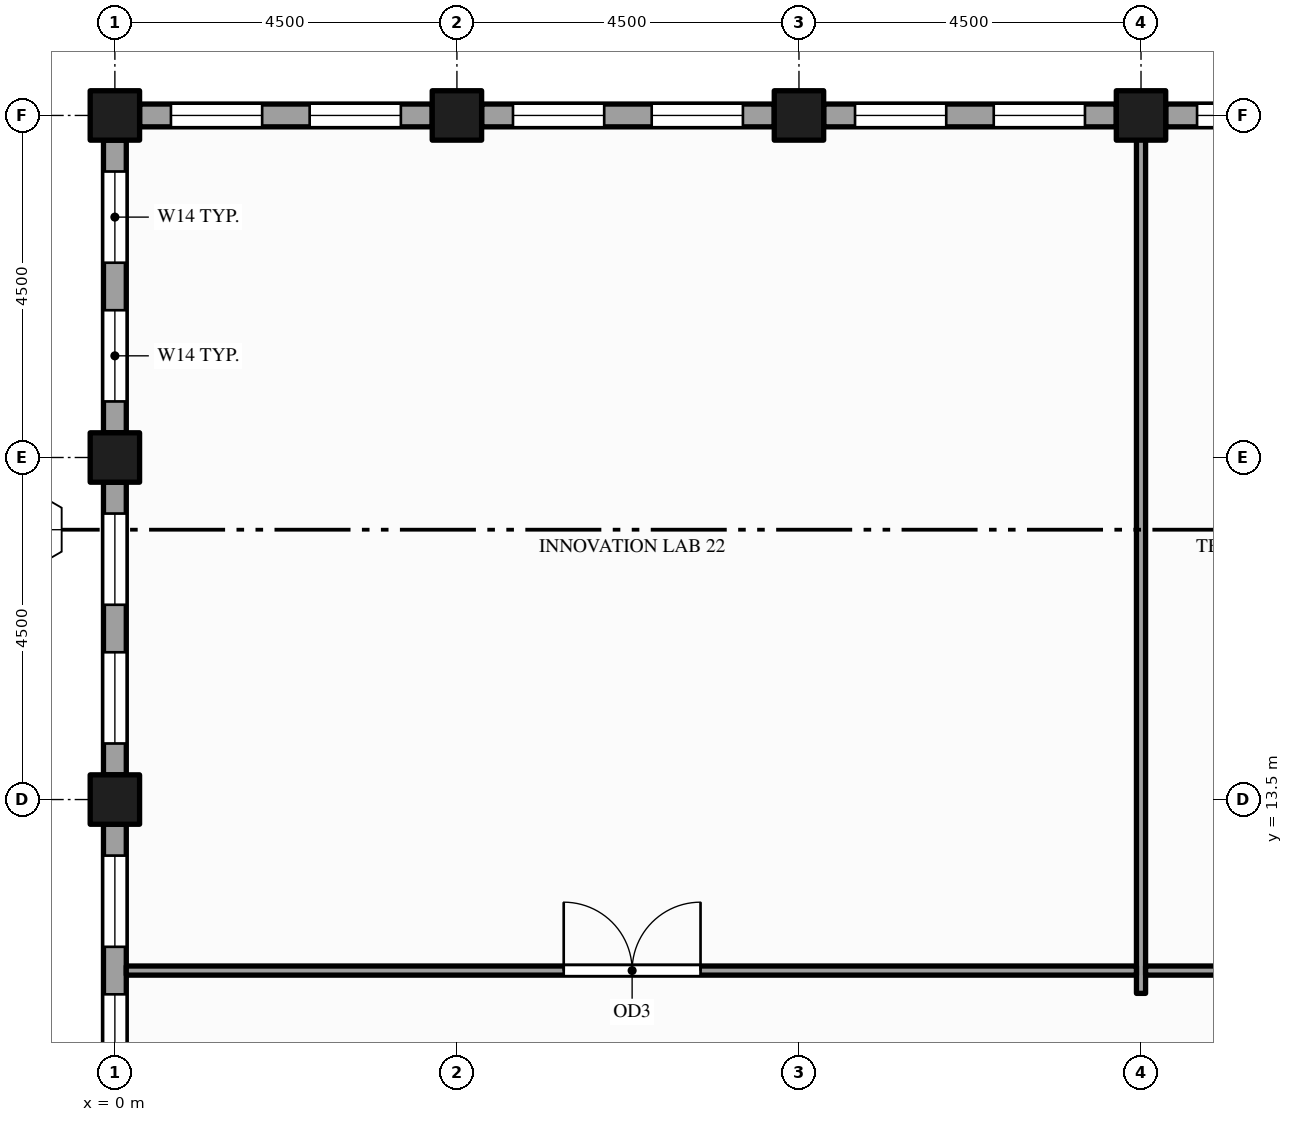
"""IFC4 building model, lengths in metres.
Left out: names, types, materials, properties, quantities, classifications, styles, units other than length and angle.
Written with IfcOpenShell. Run it as: python <this file> out.ifc"""

import sys

from ifc_helpers import new_model, si_unit, direction, frame, frame_2d, origin, origin_2d, place, context, subcontext, project, spatial, rectangle, hollow_rectangle, extrude, element, fill, save


model = new_model("IFC4")
c1 = context("Model", 3, precision=1e-05, world=origin(), true_north=direction((0.0, 1.0)))
c2 = subcontext(c1, "Body", "Model", "MODEL_VIEW")
j1 = project(units=[si_unit("LENGTHUNIT", "METRE"), si_unit("PLANEANGLEUNIT", "RADIAN")], contexts=[c1])
p1 = place(None, origin())
s1 = spatial("IfcSite", under=j1, at=p1, CompositionType="ELEMENT")
p2 = place(p1, origin())
s2 = spatial("IfcBuilding", under=s1, at=p2, CompositionType="ELEMENT")
p3 = place(p2, frame((0.0, 0.0, 289.0)))
s3 = spatial("IfcBuildingStorey", under=s2, at=p3, CompositionType="ELEMENT", Elevation=289.0)
for number, where, z_axis, x_axis in (
    (1, (0.0, 13.5, -0.15), (0.0, 0.0, 1.0), (1.0, 0.0, 0.0)),
    (2, (0.0, 18.0, -0.15), (0.0, 0.0, 1.0), (1.0, 0.0, 0.0)),
    (3, (0.0, 22.5, -0.15), (0.0, 0.0, 1.0), (1.0, 0.0, 0.0)),
    (4, (4.5, 22.5, -0.15), (0.0, 0.0, 1.0), (1.0, 0.0, 0.0)),
    (5, (9.0, 22.5, -0.15), (0.0, 0.0, 1.0), (1.0, 0.0, 0.0)),
    (6, (13.5, 22.5, -0.15), (0.0, 0.0, 1.0), (1.0, 0.0, 0.0)),
):
    element("IfcColumn", number, at=place(p3, frame(where, z_axis=z_axis, x_axis=x_axis)), inside=s3, PredefinedType="COLUMN", context=c2, shape_type="SweptSolid", body=[
        extrude(hollow_rectangle(XDim=0.65, YDim=0.65, WallThickness=0.032, at=origin_2d()), origin(), (0.0, 0.0, 1.0), 4.0),
    ])
p4 = place(p3, frame((17.675, 22.5, 0.0), z_axis=(0.0, 0.0, 1.0), x_axis=(-1.0, 0.0, 0.0)))
e7 = element("IfcWall", 7, at=p4, inside=s3, PredefinedType="STANDARD", context=c2, shape_type="SweptSolid", body=[
    extrude(rectangle(XDim=3.85, YDim=0.3, at=frame_2d((1.925, 0.0))), origin(), (0.0, 0.0, 1.0), 2.87),
])
p5 = place(p4, frame((0.413, 0.0, 0.9)))
e8 = element("IfcOpeningElement", 8, at=p5, cuts=e7, PredefinedType="OPENING", context=c2, shape_type="SweptSolid", body=[
    extrude(rectangle(XDim=1.2, YDim=1.75, at=frame_2d((0.6, 0.875))), frame((0.0, 0.16, 0.0), z_axis=(0.0, -1.0, 0.0), x_axis=(1.0, 0.0, 0.0)), (0.0, 0.0, 1.0), 0.32),
])
p6 = place(p4, frame((2.238, 0.0, 0.9)))
e9 = element("IfcOpeningElement", 9, at=p6, cuts=e7, PredefinedType="OPENING", context=c2, shape_type="SweptSolid", body=[
    extrude(rectangle(XDim=1.2, YDim=1.75, at=frame_2d((0.6, 0.875))), frame((0.0, 0.16, 0.0), z_axis=(0.0, -1.0, 0.0), x_axis=(1.0, 0.0, 0.0)), (0.0, 0.0, 1.0), 0.32),
])
p7 = place(p3, frame((13.175, 22.5, 0.0), z_axis=(0.0, 0.0, 1.0), x_axis=(-1.0, 0.0, 0.0)))
e10 = element("IfcWall", 10, at=p7, inside=s3, PredefinedType="STANDARD", context=c2, shape_type="SweptSolid", body=[
    extrude(rectangle(XDim=3.85, YDim=0.3, at=frame_2d((1.925, 0.0))), origin(), (0.0, 0.0, 1.0), 2.87),
])
p8 = place(p7, frame((0.413, 0.0, 0.9)))
e11 = element("IfcOpeningElement", 11, at=p8, cuts=e10, PredefinedType="OPENING", context=c2, shape_type="SweptSolid", body=[
    extrude(rectangle(XDim=1.2, YDim=1.75, at=frame_2d((0.6, 0.875))), frame((0.0, 0.16, 0.0), z_axis=(0.0, -1.0, 0.0), x_axis=(1.0, 0.0, 0.0)), (0.0, 0.0, 1.0), 0.32),
])
p9 = place(p7, frame((2.238, 0.0, 0.9)))
e12 = element("IfcOpeningElement", 12, at=p9, cuts=e10, PredefinedType="OPENING", context=c2, shape_type="SweptSolid", body=[
    extrude(rectangle(XDim=1.2, YDim=1.75, at=frame_2d((0.6, 0.875))), frame((0.0, 0.16, 0.0), z_axis=(0.0, -1.0, 0.0), x_axis=(1.0, 0.0, 0.0)), (0.0, 0.0, 1.0), 0.32),
])
p10 = place(p3, frame((8.675, 22.5, 0.0), z_axis=(0.0, 0.0, 1.0), x_axis=(-1.0, 0.0, 0.0)))
e13 = element("IfcWall", 13, at=p10, inside=s3, PredefinedType="STANDARD", context=c2, shape_type="SweptSolid", body=[
    extrude(rectangle(XDim=3.85, YDim=0.3, at=frame_2d((1.925, 0.0))), origin(), (0.0, 0.0, 1.0), 2.87),
])
p11 = place(p10, frame((0.413, 0.0, 0.9)))
e14 = element("IfcOpeningElement", 14, at=p11, cuts=e13, PredefinedType="OPENING", context=c2, shape_type="SweptSolid", body=[
    extrude(rectangle(XDim=1.2, YDim=1.75, at=frame_2d((0.6, 0.875))), frame((0.0, 0.16, 0.0), z_axis=(0.0, -1.0, 0.0), x_axis=(1.0, 0.0, 0.0)), (0.0, 0.0, 1.0), 0.32),
])
p12 = place(p10, frame((2.238, 0.0, 0.9)))
e15 = element("IfcOpeningElement", 15, at=p12, cuts=e13, PredefinedType="OPENING", context=c2, shape_type="SweptSolid", body=[
    extrude(rectangle(XDim=1.2, YDim=1.75, at=frame_2d((0.6, 0.875))), frame((0.0, 0.16, 0.0), z_axis=(0.0, -1.0, 0.0), x_axis=(1.0, 0.0, 0.0)), (0.0, 0.0, 1.0), 0.32),
])
p13 = place(p3, frame((4.175, 22.5, 0.0), z_axis=(0.0, 0.0, 1.0), x_axis=(-1.0, 0.0, 0.0)))
e16 = element("IfcWall", 16, at=p13, inside=s3, PredefinedType="STANDARD", context=c2, shape_type="SweptSolid", body=[
    extrude(rectangle(XDim=3.85, YDim=0.3, at=frame_2d((1.925, 0.0))), origin(), (0.0, 0.0, 1.0), 2.87),
])
p14 = place(p13, frame((0.413, 0.0, 0.9)))
e17 = element("IfcOpeningElement", 17, at=p14, cuts=e16, PredefinedType="OPENING", context=c2, shape_type="SweptSolid", body=[
    extrude(rectangle(XDim=1.2, YDim=1.75, at=frame_2d((0.6, 0.875))), frame((0.0, 0.16, 0.0), z_axis=(0.0, -1.0, 0.0), x_axis=(1.0, 0.0, 0.0)), (0.0, 0.0, 1.0), 0.32),
])
p15 = place(p13, frame((2.238, 0.0, 0.9)))
e18 = element("IfcOpeningElement", 18, at=p15, cuts=e16, PredefinedType="OPENING", context=c2, shape_type="SweptSolid", body=[
    extrude(rectangle(XDim=1.2, YDim=1.75, at=frame_2d((0.6, 0.875))), frame((0.0, 0.16, 0.0), z_axis=(0.0, -1.0, 0.0), x_axis=(1.0, 0.0, 0.0)), (0.0, 0.0, 1.0), 0.32),
])
p16 = place(p3, frame((0.0, 22.175, 0.0), z_axis=(0.0, 0.0, 1.0), x_axis=(0.0, -1.0, 0.0)))
e19 = element("IfcWall", 19, at=p16, inside=s3, PredefinedType="STANDARD", context=c2, shape_type="SweptSolid", body=[
    extrude(rectangle(XDim=3.85, YDim=0.3, at=frame_2d((1.925, 0.0))), origin(), (0.0, 0.0, 1.0), 3.162),
])
p17 = place(p16, frame((0.413, 0.0, 0.9)))
e20 = element("IfcOpeningElement", 20, at=p17, cuts=e19, PredefinedType="OPENING", context=c2, shape_type="SweptSolid", body=[
    extrude(rectangle(XDim=1.2, YDim=2.0, at=frame_2d((0.6, 1.0))), frame((0.0, 0.16, 0.0), z_axis=(0.0, -1.0, 0.0), x_axis=(1.0, 0.0, 0.0)), (0.0, 0.0, 1.0), 0.32),
])
p18 = place(p16, frame((2.238, 0.0, 0.9)))
e21 = element("IfcOpeningElement", 21, at=p18, cuts=e19, PredefinedType="OPENING", context=c2, shape_type="SweptSolid", body=[
    extrude(rectangle(XDim=1.2, YDim=2.0, at=frame_2d((0.6, 1.0))), frame((0.0, 0.16, 0.0), z_axis=(0.0, -1.0, 0.0), x_axis=(1.0, 0.0, 0.0)), (0.0, 0.0, 1.0), 0.32),
])
p19 = place(p3, frame((0.0, 17.675, 0.0), z_axis=(0.0, 0.0, 1.0), x_axis=(0.0, -1.0, 0.0)))
e22 = element("IfcWall", 22, at=p19, inside=s3, PredefinedType="STANDARD", context=c2, shape_type="SweptSolid", body=[
    extrude(rectangle(XDim=3.85, YDim=0.3, at=frame_2d((1.925, 0.0))), origin(), (0.0, 0.0, 1.0), 3.162),
])
p20 = place(p19, frame((0.413, 0.0, 0.9)))
e23 = element("IfcOpeningElement", 23, at=p20, cuts=e22, PredefinedType="OPENING", context=c2, shape_type="SweptSolid", body=[
    extrude(rectangle(XDim=1.2, YDim=2.0, at=frame_2d((0.6, 1.0))), frame((0.0, 0.16, 0.0), z_axis=(0.0, -1.0, 0.0), x_axis=(1.0, 0.0, 0.0)), (0.0, 0.0, 1.0), 0.32),
])
p21 = place(p19, frame((2.238, 0.0, 0.9)))
e24 = element("IfcOpeningElement", 24, at=p21, cuts=e22, PredefinedType="OPENING", context=c2, shape_type="SweptSolid", body=[
    extrude(rectangle(XDim=1.2, YDim=2.0, at=frame_2d((0.6, 1.0))), frame((0.0, 0.16, 0.0), z_axis=(0.0, -1.0, 0.0), x_axis=(1.0, 0.0, 0.0)), (0.0, 0.0, 1.0), 0.32),
])
p22 = place(p3, frame((0.0, 13.175, 0.0), z_axis=(0.0, 0.0, 1.0), x_axis=(0.0, -1.0, 0.0)))
e25 = element("IfcWall", 25, at=p22, inside=s3, PredefinedType="STANDARD", context=c2, shape_type="SweptSolid", body=[
    extrude(rectangle(XDim=3.85, YDim=0.3, at=frame_2d((1.925, 0.0))), origin(), (0.0, 0.0, 1.0), 3.162),
])
p23 = place(p22, frame((0.413, 0.0, 0.9)))
e26 = element("IfcOpeningElement", 26, at=p23, cuts=e25, PredefinedType="OPENING", context=c2, shape_type="SweptSolid", body=[
    extrude(rectangle(XDim=1.2, YDim=2.0, at=frame_2d((0.6, 1.0))), frame((0.0, 0.16, 0.0), z_axis=(0.0, -1.0, 0.0), x_axis=(1.0, 0.0, 0.0)), (0.0, 0.0, 1.0), 0.32),
])
p24 = place(p22, frame((2.238, 0.0, 0.9)))
e27 = element("IfcOpeningElement", 27, at=p24, cuts=e25, PredefinedType="OPENING", context=c2, shape_type="SweptSolid", body=[
    extrude(rectangle(XDim=1.2, YDim=2.0, at=frame_2d((0.6, 1.0))), frame((0.0, 0.16, 0.0), z_axis=(0.0, -1.0, 0.0), x_axis=(1.0, 0.0, 0.0)), (0.0, 0.0, 1.0), 0.32),
])
p25 = place(p3, frame((13.5, 10.95, 0.0), z_axis=(0.0, 0.0, 1.0), x_axis=(0.0, 1.0, 0.0)))
e28 = element("IfcWall", 28, at=p25, inside=s3, PredefinedType="PARTITIONING", context=c2, shape_type="SweptSolid", body=[
    extrude(rectangle(XDim=11.4, YDim=0.12, at=frame_2d((5.7, 0.0))), origin(), (0.0, 0.0, 1.0), 2.87),
])
p26 = place(p3, frame((0.15, 11.25, 0.0), z_axis=(0.0, 0.0, 1.0), x_axis=(1.0, 0.0, 0.0)))
e29 = element("IfcWall", 29, at=p26, inside=s3, PredefinedType="PARTITIONING", context=c2, shape_type="SweptSolid", body=[
    extrude(rectangle(XDim=13.29, YDim=0.12, at=frame_2d((6.645, 0.0))), origin(), (0.0, 0.0, 1.0), 2.87),
])
p27 = place(p26, frame((5.755, 0.0, 0.0)))
e30 = element("IfcOpeningElement", 30, at=p27, cuts=e29, PredefinedType="OPENING", context=c2, shape_type="SweptSolid", body=[
    extrude(rectangle(XDim=1.8, YDim=2.1, at=frame_2d((0.9, 1.05))), frame((0.0, 0.07, 0.0), z_axis=(0.0, -1.0, 0.0), x_axis=(1.0, 0.0, 0.0)), (0.0, 0.0, 1.0), 0.14),
])
p28 = place(p3, frame((13.56, 11.25, 0.0), z_axis=(0.0, 0.0, 1.0), x_axis=(1.0, 0.0, 0.0)))
e31 = element("IfcWall", 31, at=p28, inside=s3, PredefinedType="PARTITIONING", context=c2, shape_type="SweptSolid", body=[
    extrude(rectangle(XDim=4.38, YDim=0.12, at=frame_2d((2.19, 0.0))), origin(), (0.0, 0.0, 1.0), 2.87),
])
p29 = place(p28, frame((1.69, 0.0, 0.0)))
e32 = element("IfcOpeningElement", 32, at=p29, cuts=e31, PredefinedType="OPENING", context=c2, shape_type="SweptSolid", body=[
    extrude(rectangle(XDim=1.0, YDim=2.1, at=frame_2d((0.5, 1.05))), frame((0.0, 0.07, 0.0), z_axis=(0.0, -1.0, 0.0), x_axis=(1.0, 0.0, 0.0)), (0.0, 0.0, 1.0), 0.14),
])
p30 = place(p6, origin())
e33 = element("IfcWindow", 33, at=p30, inside=s3, PartitioningType="SINGLE_PANEL", PredefinedType="WINDOW", context=c2, shape_type="SweptSolid", body=[
    extrude(rectangle(XDim=1.2, YDim=1.75, at=frame_2d((0.6, 0.875))), frame((0.0, 0.03, 0.0), z_axis=(0.0, -1.0, 0.0), x_axis=(1.0, 0.0, 0.0)), (0.0, 0.0, 1.0), 0.06),
])
fill(e9, e33)
p31 = place(p8, origin())
e34 = element("IfcWindow", 34, at=p31, inside=s3, PartitioningType="SINGLE_PANEL", PredefinedType="WINDOW", context=c2, shape_type="SweptSolid", body=[
    extrude(rectangle(XDim=1.2, YDim=1.75, at=frame_2d((0.6, 0.875))), frame((0.0, 0.03, 0.0), z_axis=(0.0, -1.0, 0.0), x_axis=(1.0, 0.0, 0.0)), (0.0, 0.0, 1.0), 0.06),
])
fill(e11, e34)
p32 = place(p9, origin())
e35 = element("IfcWindow", 35, at=p32, inside=s3, PartitioningType="SINGLE_PANEL", PredefinedType="WINDOW", context=c2, shape_type="SweptSolid", body=[
    extrude(rectangle(XDim=1.2, YDim=1.75, at=frame_2d((0.6, 0.875))), frame((0.0, 0.03, 0.0), z_axis=(0.0, -1.0, 0.0), x_axis=(1.0, 0.0, 0.0)), (0.0, 0.0, 1.0), 0.06),
])
fill(e12, e35)
p33 = place(p11, origin())
e36 = element("IfcWindow", 36, at=p33, inside=s3, PartitioningType="SINGLE_PANEL", PredefinedType="WINDOW", context=c2, shape_type="SweptSolid", body=[
    extrude(rectangle(XDim=1.2, YDim=1.75, at=frame_2d((0.6, 0.875))), frame((0.0, 0.03, 0.0), z_axis=(0.0, -1.0, 0.0), x_axis=(1.0, 0.0, 0.0)), (0.0, 0.0, 1.0), 0.06),
])
fill(e14, e36)
p34 = place(p12, origin())
e37 = element("IfcWindow", 37, at=p34, inside=s3, PartitioningType="SINGLE_PANEL", PredefinedType="WINDOW", context=c2, shape_type="SweptSolid", body=[
    extrude(rectangle(XDim=1.2, YDim=1.75, at=frame_2d((0.6, 0.875))), frame((0.0, 0.03, 0.0), z_axis=(0.0, -1.0, 0.0), x_axis=(1.0, 0.0, 0.0)), (0.0, 0.0, 1.0), 0.06),
])
fill(e15, e37)
p35 = place(p14, origin())
e38 = element("IfcWindow", 38, at=p35, inside=s3, PartitioningType="SINGLE_PANEL", PredefinedType="WINDOW", context=c2, shape_type="SweptSolid", body=[
    extrude(rectangle(XDim=1.2, YDim=1.75, at=frame_2d((0.6, 0.875))), frame((0.0, 0.03, 0.0), z_axis=(0.0, -1.0, 0.0), x_axis=(1.0, 0.0, 0.0)), (0.0, 0.0, 1.0), 0.06),
])
fill(e17, e38)
p36 = place(p15, origin())
e39 = element("IfcWindow", 39, at=p36, inside=s3, PartitioningType="SINGLE_PANEL", PredefinedType="WINDOW", context=c2, shape_type="SweptSolid", body=[
    extrude(rectangle(XDim=1.2, YDim=1.75, at=frame_2d((0.6, 0.875))), frame((0.0, 0.03, 0.0), z_axis=(0.0, -1.0, 0.0), x_axis=(1.0, 0.0, 0.0)), (0.0, 0.0, 1.0), 0.06),
])
fill(e18, e39)
p37 = place(p17, origin())
e40 = element("IfcWindow", 40, at=p37, inside=s3, PartitioningType="SINGLE_PANEL", PredefinedType="WINDOW", context=c2, shape_type="SweptSolid", body=[
    extrude(rectangle(XDim=1.2, YDim=2.0, at=frame_2d((0.6, 1.0))), frame((0.0, 0.03, 0.0), z_axis=(0.0, -1.0, 0.0), x_axis=(1.0, 0.0, 0.0)), (0.0, 0.0, 1.0), 0.06),
])
fill(e20, e40)
p38 = place(p18, origin())
e41 = element("IfcWindow", 41, at=p38, inside=s3, PartitioningType="SINGLE_PANEL", PredefinedType="WINDOW", context=c2, shape_type="SweptSolid", body=[
    extrude(rectangle(XDim=1.2, YDim=2.0, at=frame_2d((0.6, 1.0))), frame((0.0, 0.03, 0.0), z_axis=(0.0, -1.0, 0.0), x_axis=(1.0, 0.0, 0.0)), (0.0, 0.0, 1.0), 0.06),
])
fill(e21, e41)
p39 = place(p20, origin())
e42 = element("IfcWindow", 42, at=p39, inside=s3, PartitioningType="SINGLE_PANEL", PredefinedType="WINDOW", context=c2, shape_type="SweptSolid", body=[
    extrude(rectangle(XDim=1.2, YDim=2.0, at=frame_2d((0.6, 1.0))), frame((0.0, 0.03, 0.0), z_axis=(0.0, -1.0, 0.0), x_axis=(1.0, 0.0, 0.0)), (0.0, 0.0, 1.0), 0.06),
])
fill(e23, e42)
p40 = place(p21, origin())
e43 = element("IfcWindow", 43, at=p40, inside=s3, PartitioningType="SINGLE_PANEL", PredefinedType="WINDOW", context=c2, shape_type="SweptSolid", body=[
    extrude(rectangle(XDim=1.2, YDim=2.0, at=frame_2d((0.6, 1.0))), frame((0.0, 0.03, 0.0), z_axis=(0.0, -1.0, 0.0), x_axis=(1.0, 0.0, 0.0)), (0.0, 0.0, 1.0), 0.06),
])
fill(e24, e43)
p41 = place(p23, origin())
e44 = element("IfcWindow", 44, at=p41, inside=s3, PartitioningType="SINGLE_PANEL", PredefinedType="WINDOW", context=c2, shape_type="SweptSolid", body=[
    extrude(rectangle(XDim=1.2, YDim=2.0, at=frame_2d((0.6, 1.0))), frame((0.0, 0.03, 0.0), z_axis=(0.0, -1.0, 0.0), x_axis=(1.0, 0.0, 0.0)), (0.0, 0.0, 1.0), 0.06),
])
fill(e26, e44)
p42 = place(p24, origin())
e45 = element("IfcWindow", 45, at=p42, inside=s3, PartitioningType="SINGLE_PANEL", PredefinedType="WINDOW", context=c2, shape_type="SweptSolid", body=[
    extrude(rectangle(XDim=1.2, YDim=2.0, at=frame_2d((0.6, 1.0))), frame((0.0, 0.03, 0.0), z_axis=(0.0, -1.0, 0.0), x_axis=(1.0, 0.0, 0.0)), (0.0, 0.0, 1.0), 0.06),
])
fill(e27, e45)
p43 = place(p27, origin())
e46 = element("IfcDoor", 46, at=p43, inside=s3, OperationType="DOUBLE_DOOR_SINGLE_SWING", PredefinedType="DOOR", context=c2, shape_type="SweptSolid", body=[
    extrude(rectangle(XDim=1.8, YDim=2.1, at=frame_2d((0.9, 1.05))), frame((0.0, 0.025, 0.0), z_axis=(0.0, -1.0, 0.0), x_axis=(1.0, 0.0, 0.0)), (0.0, 0.0, 1.0), 0.05),
])
fill(e30, e46)
save(model, sys.argv[1])
